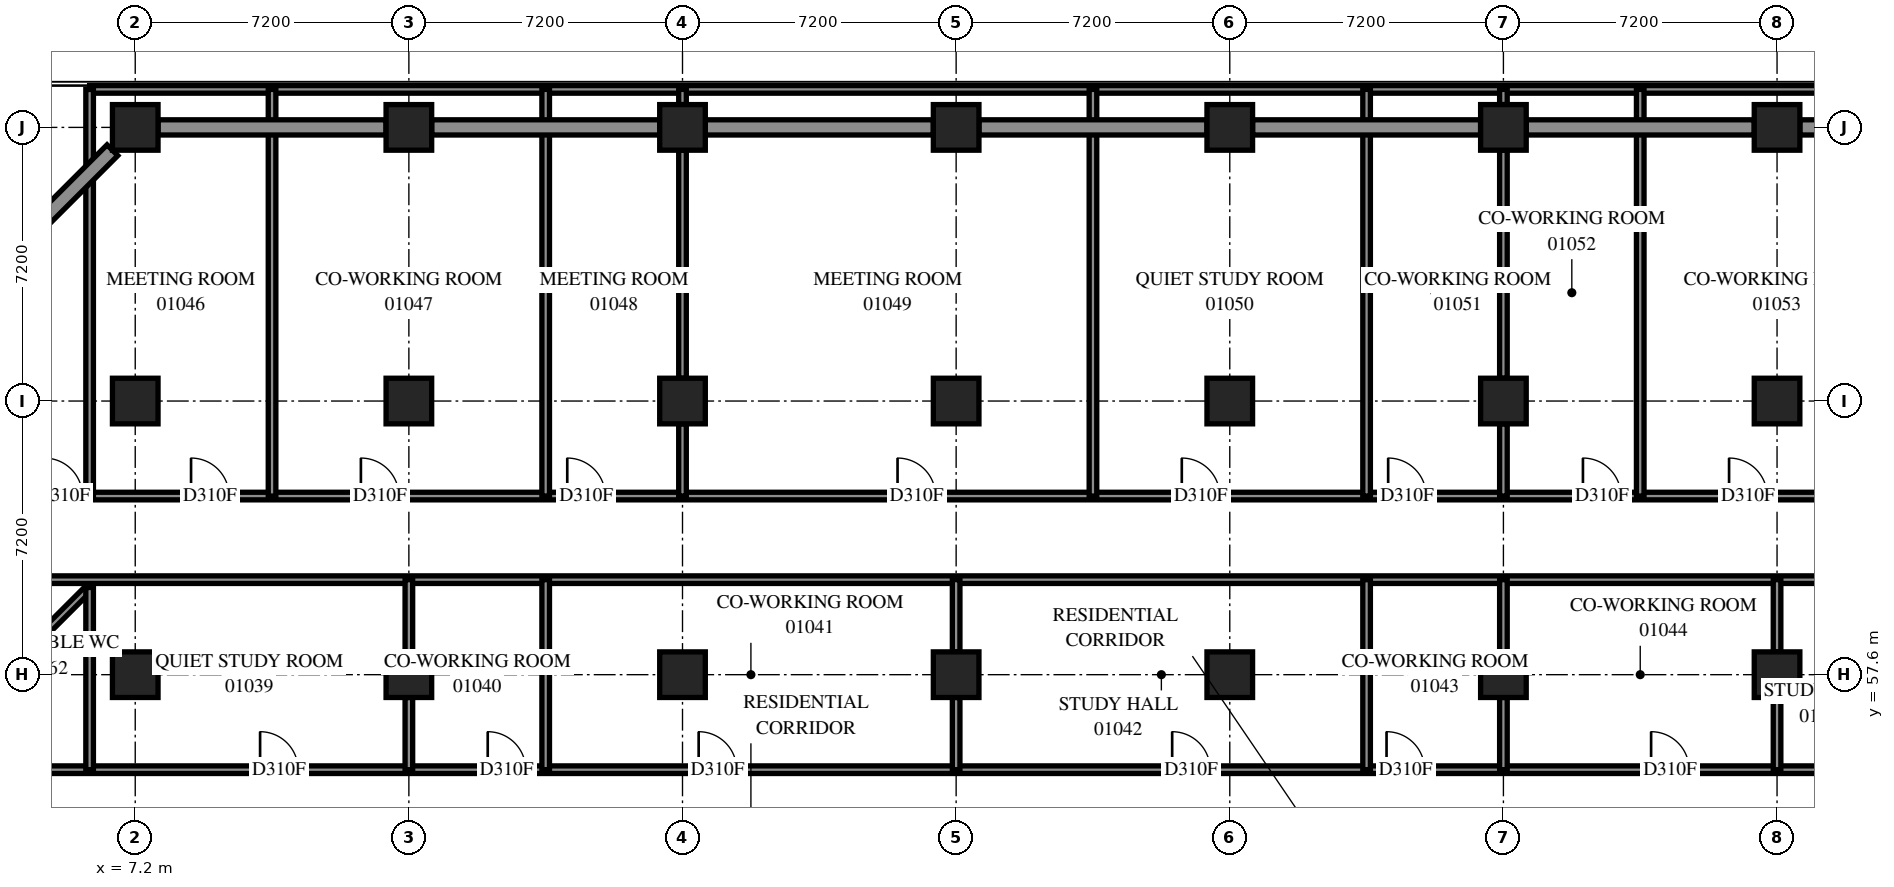
"""IFC4 building model, lengths in metres.
Left out: names, types, materials, properties, quantities, classifications, styles, units other than length and angle.
Written with IfcOpenShell. Run it as: python <this file> out.ifc"""

import sys

from ifc_helpers import new_model, si_unit, direction, frame, frame_2d, origin, origin_2d, place, context, subcontext, project, spatial, rectangle, extrude, element, fill, save


model = new_model("IFC4")
c1 = context("Model", 3, precision=1e-05, world=origin(), true_north=direction((0.0, 1.0)))
c2 = subcontext(c1, "Body", "Model", "MODEL_VIEW")
j1 = project(units=[si_unit("LENGTHUNIT", "METRE"), si_unit("PLANEANGLEUNIT", "RADIAN")], contexts=[c1])
p1 = place(None, origin())
s1 = spatial("IfcSite", under=j1, at=p1, CompositionType="ELEMENT")
p2 = place(p1, origin())
s2 = spatial("IfcBuilding", under=s1, at=p2, CompositionType="ELEMENT")
p3 = place(p2, frame((0.0, 0.0, 6.0)))
s3 = spatial("IfcBuildingStorey", under=s2, at=p3, CompositionType="ELEMENT", Elevation=6.0)
for number, where, z_axis, x_axis in (
    (1, (7.2, 57.6, 0.0), (0.0, 0.0, 1.0), (1.0, 0.0, 0.0)),
    (2, (7.2, 64.8, 0.0), (0.0, 0.0, 1.0), (1.0, 0.0, 0.0)),
    (3, (7.2, 72.0, 0.0), (0.0, 0.0, 1.0), (1.0, 0.0, 0.0)),
    (4, (14.4, 57.6, 0.0), (0.0, 0.0, 1.0), (1.0, 0.0, 0.0)),
    (5, (14.4, 64.8, 0.0), (0.0, 0.0, 1.0), (1.0, 0.0, 0.0)),
    (6, (14.4, 72.0, 0.0), (0.0, 0.0, 1.0), (1.0, 0.0, 0.0)),
    (7, (21.6, 57.6, 0.0), (0.0, 0.0, 1.0), (1.0, 0.0, 0.0)),
    (8, (21.6, 64.8, 0.0), (0.0, 0.0, 1.0), (1.0, 0.0, 0.0)),
    (9, (21.6, 72.0, 0.0), (0.0, 0.0, 1.0), (1.0, 0.0, 0.0)),
    (10, (28.8, 57.6, 0.0), (0.0, 0.0, 1.0), (1.0, 0.0, 0.0)),
    (11, (28.8, 64.8, 0.0), (0.0, 0.0, 1.0), (1.0, 0.0, 0.0)),
    (12, (28.8, 72.0, 0.0), (0.0, 0.0, 1.0), (1.0, 0.0, 0.0)),
    (13, (36.0, 57.6, 0.0), (0.0, 0.0, 1.0), (1.0, 0.0, 0.0)),
    (14, (36.0, 64.8, 0.0), (0.0, 0.0, 1.0), (1.0, 0.0, 0.0)),
    (15, (36.0, 72.0, 0.0), (0.0, 0.0, 1.0), (1.0, 0.0, 0.0)),
    (16, (43.2, 57.6, 0.0), (0.0, 0.0, 1.0), (1.0, 0.0, 0.0)),
    (17, (43.2, 64.8, 0.0), (0.0, 0.0, 1.0), (1.0, 0.0, 0.0)),
    (18, (43.2, 72.0, 0.0), (0.0, 0.0, 1.0), (1.0, 0.0, 0.0)),
    (19, (50.4, 57.6, 0.0), (0.0, 0.0, 1.0), (1.0, 0.0, 0.0)),
    (20, (50.4, 64.8, 0.0), (0.0, 0.0, 1.0), (1.0, 0.0, 0.0)),
    (21, (50.4, 72.0, 0.0), (0.0, 0.0, 1.0), (1.0, 0.0, 0.0)),
):
    element("IfcColumn", number, at=place(p3, frame(where, z_axis=z_axis, x_axis=x_axis)), inside=s3, PredefinedType="COLUMN", context=c2, shape_type="SweptSolid", body=[
        extrude(rectangle(XDim=1.2, YDim=1.2, at=origin_2d()), origin(), (0.0, 0.0, 1.0), 3.8),
    ])
p4 = place(p3, frame((6.0, 73.0, 0.0), z_axis=(0.0, 0.0, 1.0), x_axis=(1.0, 0.0, 0.0)))
e22 = element("IfcWall", 22, at=p4, inside=s3, PredefinedType="PARTITIONING", context=c2, shape_type="SweptSolid", body=[
    extrude(rectangle(XDim=73.2, YDim=0.2, at=frame_2d((36.6, 0.0))), origin(), (0.0, 0.0, 1.0), 3.8),
])
p5 = place(p3, frame((0.0, 55.1, 0.0), z_axis=(0.0, 0.0, 1.0), x_axis=(1.0, 0.0, 0.0)))
e23 = element("IfcWall", 23, at=p5, inside=s3, PredefinedType="PARTITIONING", context=c2, shape_type="SweptSolid", body=[
    extrude(rectangle(XDim=54.4, YDim=0.2, at=frame_2d((27.2, 0.0))), origin(), (0.0, 0.0, 1.0), 3.8),
])
p6 = place(p5, frame((10.485, 0.0, 0.0)))
e24 = element("IfcOpeningElement", 24, at=p6, cuts=e23, PredefinedType="OPENING", context=c2, shape_type="SweptSolid", body=[
    extrude(rectangle(XDim=1.0, YDim=2.1, at=frame_2d((0.5, 1.05))), frame((0.0, 0.11, 0.0), z_axis=(0.0, -1.0, 0.0), x_axis=(1.0, 0.0, 0.0)), (0.0, 0.0, 1.0), 0.22),
])
p7 = place(p5, frame((16.475, 0.0, 0.0)))
e25 = element("IfcOpeningElement", 25, at=p7, cuts=e23, PredefinedType="OPENING", context=c2, shape_type="SweptSolid", body=[
    extrude(rectangle(XDim=1.0, YDim=2.1, at=frame_2d((0.5, 1.05))), frame((0.0, 0.11, 0.0), z_axis=(0.0, -1.0, 0.0), x_axis=(1.0, 0.0, 0.0)), (0.0, 0.0, 1.0), 0.22),
])
p8 = place(p5, frame((22.025, 0.0, 0.0)))
e26 = element("IfcOpeningElement", 26, at=p8, cuts=e23, PredefinedType="OPENING", context=c2, shape_type="SweptSolid", body=[
    extrude(rectangle(XDim=1.0, YDim=2.1, at=frame_2d((0.5, 1.05))), frame((0.0, 0.11, 0.0), z_axis=(0.0, -1.0, 0.0), x_axis=(1.0, 0.0, 0.0)), (0.0, 0.0, 1.0), 0.22),
])
p9 = place(p5, frame((34.484, 0.0, 0.0)))
e27 = element("IfcOpeningElement", 27, at=p9, cuts=e23, PredefinedType="OPENING", context=c2, shape_type="SweptSolid", body=[
    extrude(rectangle(XDim=1.0, YDim=2.1, at=frame_2d((0.5, 1.05))), frame((0.0, 0.11, 0.0), z_axis=(0.0, -1.0, 0.0), x_axis=(1.0, 0.0, 0.0)), (0.0, 0.0, 1.0), 0.22),
])
p10 = place(p5, frame((40.125, 0.0, 0.0)))
e28 = element("IfcOpeningElement", 28, at=p10, cuts=e23, PredefinedType="OPENING", context=c2, shape_type="SweptSolid", body=[
    extrude(rectangle(XDim=1.0, YDim=2.1, at=frame_2d((0.5, 1.05))), frame((0.0, 0.11, 0.0), z_axis=(0.0, -1.0, 0.0), x_axis=(1.0, 0.0, 0.0)), (0.0, 0.0, 1.0), 0.22),
])
p11 = place(p5, frame((47.086, 0.0, 0.0)))
e29 = element("IfcOpeningElement", 29, at=p11, cuts=e23, PredefinedType="OPENING", context=c2, shape_type="SweptSolid", body=[
    extrude(rectangle(XDim=1.0, YDim=2.1, at=frame_2d((0.5, 1.05))), frame((0.0, 0.11, 0.0), z_axis=(0.0, -1.0, 0.0), x_axis=(1.0, 0.0, 0.0)), (0.0, 0.0, 1.0), 0.22),
])
p12 = place(p5, frame((52.709, 0.0, 0.0)))
e30 = element("IfcOpeningElement", 30, at=p12, cuts=e23, PredefinedType="OPENING", context=c2, shape_type="SweptSolid", body=[
    extrude(rectangle(XDim=1.0, YDim=2.1, at=frame_2d((0.5, 1.05))), frame((0.0, 0.11, 0.0), z_axis=(0.0, -1.0, 0.0), x_axis=(1.0, 0.0, 0.0)), (0.0, 0.0, 1.0), 0.22),
])
p13 = place(p5, frame((2.451, 0.0, 0.0)))
e31 = element("IfcOpeningElement", 31, at=p13, cuts=e23, PredefinedType="OPENING", context=c2, shape_type="SweptSolid", body=[
    extrude(rectangle(XDim=1.0, YDim=2.1, at=frame_2d((0.5, 1.05))), frame((0.0, 0.11, 0.0), z_axis=(0.0, -1.0, 0.0), x_axis=(1.0, 0.0, 0.0)), (0.0, 0.0, 1.0), 0.22),
])
p14 = place(p3, frame((0.002, 60.1, 0.0), z_axis=(0.0, 0.0, 1.0), x_axis=(1.0, 0.0, 0.0)))
e32 = element("IfcWall", 32, at=p14, inside=s3, PredefinedType="PARTITIONING", context=c2, shape_type="SweptSolid", body=[
    extrude(rectangle(XDim=54.398, YDim=0.2, at=frame_2d((27.199, 0.0))), origin(), (0.0, 0.0, 1.0), 3.8),
])
p15 = place(p14, frame((3.729, 0.0, 0.0)))
e33 = element("IfcOpeningElement", 33, at=p15, cuts=e32, PredefinedType="OPENING", context=c2, shape_type="SweptSolid", body=[
    extrude(rectangle(XDim=1.0, YDim=2.1, at=frame_2d((0.5, 1.05))), frame((0.0, 0.11, 0.0), z_axis=(0.0, -1.0, 0.0), x_axis=(1.0, 0.0, 0.0)), (0.0, 0.0, 1.0), 0.22),
])
p16 = place(p3, frame((0.002, 62.3, 0.0), z_axis=(0.0, 0.0, 1.0), x_axis=(1.0, 0.0, 0.0)))
e34 = element("IfcWall", 34, at=p16, inside=s3, PredefinedType="PARTITIONING", context=c2, shape_type="SweptSolid", body=[
    extrude(rectangle(XDim=54.398, YDim=0.2, at=frame_2d((27.199, 0.0))), origin(), (0.0, 0.0, 1.0), 3.8),
])
p17 = place(p16, frame((8.667, 0.0, 0.0)))
e35 = element("IfcOpeningElement", 35, at=p17, cuts=e34, PredefinedType="OPENING", context=c2, shape_type="SweptSolid", body=[
    extrude(rectangle(XDim=1.0, YDim=2.1, at=frame_2d((0.5, 1.05))), frame((0.0, 0.11, 0.0), z_axis=(0.0, -1.0, 0.0), x_axis=(1.0, 0.0, 0.0)), (0.0, 0.0, 1.0), 0.22),
])
p18 = place(p16, frame((13.136, 0.0, 0.0)))
e36 = element("IfcOpeningElement", 36, at=p18, cuts=e34, PredefinedType="OPENING", context=c2, shape_type="SweptSolid", body=[
    extrude(rectangle(XDim=1.0, YDim=2.1, at=frame_2d((0.5, 1.05))), frame((0.0, 0.11, 0.0), z_axis=(0.0, -1.0, 0.0), x_axis=(1.0, 0.0, 0.0)), (0.0, 0.0, 1.0), 0.22),
])
p19 = place(p16, frame((18.566, 0.0, 0.0)))
e37 = element("IfcOpeningElement", 37, at=p19, cuts=e34, PredefinedType="OPENING", context=c2, shape_type="SweptSolid", body=[
    extrude(rectangle(XDim=1.0, YDim=2.1, at=frame_2d((0.5, 1.05))), frame((0.0, 0.11, 0.0), z_axis=(0.0, -1.0, 0.0), x_axis=(1.0, 0.0, 0.0)), (0.0, 0.0, 1.0), 0.22),
])
p20 = place(p16, frame((27.256, 0.0, 0.0)))
e38 = element("IfcOpeningElement", 38, at=p20, cuts=e34, PredefinedType="OPENING", context=c2, shape_type="SweptSolid", body=[
    extrude(rectangle(XDim=1.0, YDim=2.1, at=frame_2d((0.5, 1.05))), frame((0.0, 0.11, 0.0), z_axis=(0.0, -1.0, 0.0), x_axis=(1.0, 0.0, 0.0)), (0.0, 0.0, 1.0), 0.22),
])
p21 = place(p16, frame((34.736, 0.0, 0.0)))
e39 = element("IfcOpeningElement", 39, at=p21, cuts=e34, PredefinedType="OPENING", context=c2, shape_type="SweptSolid", body=[
    extrude(rectangle(XDim=1.0, YDim=2.1, at=frame_2d((0.5, 1.05))), frame((0.0, 0.11, 0.0), z_axis=(0.0, -1.0, 0.0), x_axis=(1.0, 0.0, 0.0)), (0.0, 0.0, 1.0), 0.22),
])
p22 = place(p16, frame((40.166, 0.0, 0.0)))
e40 = element("IfcOpeningElement", 40, at=p22, cuts=e34, PredefinedType="OPENING", context=c2, shape_type="SweptSolid", body=[
    extrude(rectangle(XDim=1.0, YDim=2.1, at=frame_2d((0.5, 1.05))), frame((0.0, 0.11, 0.0), z_axis=(0.0, -1.0, 0.0), x_axis=(1.0, 0.0, 0.0)), (0.0, 0.0, 1.0), 0.22),
])
p23 = place(p16, frame((45.291, 0.0, 0.0)))
e41 = element("IfcOpeningElement", 41, at=p23, cuts=e34, PredefinedType="OPENING", context=c2, shape_type="SweptSolid", body=[
    extrude(rectangle(XDim=1.0, YDim=2.1, at=frame_2d((0.5, 1.05))), frame((0.0, 0.11, 0.0), z_axis=(0.0, -1.0, 0.0), x_axis=(1.0, 0.0, 0.0)), (0.0, 0.0, 1.0), 0.22),
])
p24 = place(p16, frame((49.136, 0.0, 0.0)))
e42 = element("IfcOpeningElement", 42, at=p24, cuts=e34, PredefinedType="OPENING", context=c2, shape_type="SweptSolid", body=[
    extrude(rectangle(XDim=1.0, YDim=2.1, at=frame_2d((0.5, 1.05))), frame((0.0, 0.11, 0.0), z_axis=(0.0, -1.0, 0.0), x_axis=(1.0, 0.0, 0.0)), (0.0, 0.0, 1.0), 0.22),
])
p25 = place(p16, frame((4.807, 0.0, 0.0)))
e43 = element("IfcOpeningElement", 43, at=p25, cuts=e34, PredefinedType="OPENING", context=c2, shape_type="SweptSolid", body=[
    extrude(rectangle(XDim=1.0, YDim=2.1, at=frame_2d((0.5, 1.05))), frame((0.0, 0.11, 0.0), z_axis=(0.0, -1.0, 0.0), x_axis=(1.0, 0.0, 0.0)), (0.0, 0.0, 1.0), 0.22),
])
for number, where, z_axis, x_axis in (
    (44, (10.8, 62.3, 0.0), (0.0, 0.0, 1.0), (0.0, 1.0, 0.0)),
    (45, (18.0, 62.3, 0.0), (0.0, 0.0, 1.0), (0.0, 1.0, 0.0)),
    (46, (32.4, 62.3, 0.0), (0.0, 0.0, 1.0), (0.0, 1.0, 0.0)),
    (47, (39.6, 62.3, 0.0), (0.0, 0.0, 1.0), (0.0, 1.0, 0.0)),
    (48, (46.8, 62.3, 0.0), (0.0, 0.0, 1.0), (0.0, 1.0, 0.0)),
):
    element("IfcWall", number, at=place(p3, frame(where, z_axis=z_axis, x_axis=x_axis)), inside=s3, PredefinedType="PARTITIONING", context=c2, shape_type="SweptSolid", body=[
        extrude(rectangle(XDim=10.7, YDim=0.2, at=frame_2d((5.35, 0.0))), origin(), (0.0, 0.0, 1.0), 3.8),
    ])
p26 = place(p3, frame((6.0, 62.3, 0.0), z_axis=(0.0, 0.0, 1.0), x_axis=(0.0, 1.0, 0.0)))
e49 = element("IfcWall", 49, at=p26, inside=s3, PredefinedType="PARTITIONING", context=c2, shape_type="SweptSolid", body=[
    extrude(rectangle(XDim=10.698, YDim=0.2, at=frame_2d((5.349, 0.0))), origin(), (0.0, 0.0, 1.0), 3.8),
])
p27 = place(p3, frame((1.205, 55.101, 0.0), z_axis=(0.0, 0.0, 1.0), x_axis=(0.7071067812, 0.7071067812, 0.0)))
e50 = element("IfcWall", 50, at=p27, inside=s3, PredefinedType="PARTITIONING", context=c2, shape_type="SweptSolid", body=[
    extrude(rectangle(XDim=6.78, YDim=0.2, at=frame_2d((3.39, 0.0))), origin(), (0.0, 0.0, 1.0), 3.8),
])
for number, where, z_axis, x_axis in (
    (51, (21.6, 65.4, 0.0), (0.0, 0.0, 1.0), (0.0, 1.0, 0.0)),
    (52, (43.2, 65.4, 0.0), (0.0, 0.0, 1.0), (0.0, 1.0, 0.0)),
):
    element("IfcWall", number, at=place(p3, frame(where, z_axis=z_axis, x_axis=x_axis)), inside=s3, PredefinedType="PARTITIONING", context=c2, shape_type="SweptSolid", body=[
        extrude(rectangle(XDim=6.0, YDim=0.2, at=frame_2d((3.0, 0.0))), origin(), (0.0, 0.0, 1.0), 3.8),
    ])
for number, where, z_axis, x_axis in (
    (53, (18.0, 55.1, 0.0), (0.0, 0.0, 1.0), (0.0, 1.0, 0.0)),
    (54, (39.6, 55.1, 0.0), (0.0, 0.0, 1.0), (0.0, 1.0, 0.0)),
):
    element("IfcWall", number, at=place(p3, frame(where, z_axis=z_axis, x_axis=x_axis)), inside=s3, PredefinedType="PARTITIONING", context=c2, shape_type="SweptSolid", body=[
        extrude(rectangle(XDim=5.0, YDim=0.2, at=frame_2d((2.5, 0.0))), origin(), (0.0, 0.0, 1.0), 3.8),
    ])
p28 = place(p3, frame((6.0, 55.1, 0.0), z_axis=(0.0, 0.0, 1.0), x_axis=(0.0, 1.0, 0.0)))
e55 = element("IfcWall", 55, at=p28, inside=s3, PredefinedType="PARTITIONING", context=c2, shape_type="SweptSolid", body=[
    extrude(rectangle(XDim=4.794, YDim=0.2, at=frame_2d((2.397, 0.0))), origin(), (0.0, 0.0, 1.0), 3.8),
])
for number, where, z_axis, x_axis in (
    (56, (21.6, 62.3, 0.0), (0.0, 0.0, 1.0), (0.0, 1.0, 0.0)),
    (57, (43.2, 62.3, 0.0), (0.0, 0.0, 1.0), (0.0, 1.0, 0.0)),
    (58, (14.4, 55.1, 0.0), (0.0, 0.0, 1.0), (0.0, 1.0, 0.0)),
    (59, (14.4, 58.2, 0.0), (0.0, 0.0, 1.0), (0.0, 1.0, 0.0)),
    (60, (28.8, 55.1, 0.0), (0.0, 0.0, 1.0), (0.0, 1.0, 0.0)),
    (61, (28.8, 58.2, 0.0), (0.0, 0.0, 1.0), (0.0, 1.0, 0.0)),
    (62, (43.2, 55.1, 0.0), (0.0, 0.0, 1.0), (0.0, 1.0, 0.0)),
    (63, (43.2, 58.2, 0.0), (0.0, 0.0, 1.0), (0.0, 1.0, 0.0)),
    (64, (50.4, 55.1, 0.0), (0.0, 0.0, 1.0), (0.0, 1.0, 0.0)),
    (65, (50.4, 58.2, 0.0), (0.0, 0.0, 1.0), (0.0, 1.0, 0.0)),
):
    element("IfcWall", number, at=place(p3, frame(where, z_axis=z_axis, x_axis=x_axis)), inside=s3, PredefinedType="PARTITIONING", context=c2, shape_type="SweptSolid", body=[
        extrude(rectangle(XDim=1.9, YDim=0.2, at=frame_2d((0.95, 0.0))), origin(), (0.0, 0.0, 1.0), 3.8),
    ])
for number, where, z_axis, x_axis in (
    (66, (21.6, 72.6, 0.0), (0.0, 0.0, 1.0), (0.0, 1.0, 0.0)),
    (67, (43.2, 72.6, 0.0), (0.0, 0.0, 1.0), (0.0, 1.0, 0.0)),
):
    element("IfcWall", number, at=place(p3, frame(where, z_axis=z_axis, x_axis=x_axis)), inside=s3, PredefinedType="PARTITIONING", context=c2, shape_type="SweptSolid", body=[
        extrude(rectangle(XDim=0.4, YDim=0.2, at=frame_2d((0.2, 0.0))), origin(), (0.0, 0.0, 1.0), 3.8),
    ])
p29 = place(p6, origin())
e68 = element("IfcDoor", 68, at=p29, inside=s3, OperationType="SINGLE_SWING_RIGHT", PredefinedType="DOOR", context=c2, shape_type="SweptSolid", body=[
    extrude(rectangle(XDim=1.0, YDim=2.1, at=frame_2d((0.5, 1.05))), frame((0.0, 0.025, 0.0), z_axis=(0.0, -1.0, 0.0), x_axis=(1.0, 0.0, 0.0)), (0.0, 0.0, 1.0), 0.05),
])
fill(e24, e68)
p30 = place(p7, origin())
e69 = element("IfcDoor", 69, at=p30, inside=s3, OperationType="SINGLE_SWING_RIGHT", PredefinedType="DOOR", context=c2, shape_type="SweptSolid", body=[
    extrude(rectangle(XDim=1.0, YDim=2.1, at=frame_2d((0.5, 1.05))), frame((0.0, 0.025, 0.0), z_axis=(0.0, -1.0, 0.0), x_axis=(1.0, 0.0, 0.0)), (0.0, 0.0, 1.0), 0.05),
])
fill(e25, e69)
p31 = place(p8, origin())
e70 = element("IfcDoor", 70, at=p31, inside=s3, OperationType="SINGLE_SWING_LEFT", PredefinedType="DOOR", context=c2, shape_type="SweptSolid", body=[
    extrude(rectangle(XDim=1.0, YDim=2.1, at=frame_2d((0.5, 1.05))), frame((0.0, 0.025, 0.0), z_axis=(0.0, -1.0, 0.0), x_axis=(1.0, 0.0, 0.0)), (0.0, 0.0, 1.0), 0.05),
])
fill(e26, e70)
p32 = place(p9, origin())
e71 = element("IfcDoor", 71, at=p32, inside=s3, OperationType="SINGLE_SWING_RIGHT", PredefinedType="DOOR", context=c2, shape_type="SweptSolid", body=[
    extrude(rectangle(XDim=1.0, YDim=2.1, at=frame_2d((0.5, 1.05))), frame((0.0, 0.025, 0.0), z_axis=(0.0, -1.0, 0.0), x_axis=(1.0, 0.0, 0.0)), (0.0, 0.0, 1.0), 0.05),
])
fill(e27, e71)
p33 = place(p10, origin())
e72 = element("IfcDoor", 72, at=p33, inside=s3, OperationType="SINGLE_SWING_LEFT", PredefinedType="DOOR", context=c2, shape_type="SweptSolid", body=[
    extrude(rectangle(XDim=1.0, YDim=2.1, at=frame_2d((0.5, 1.05))), frame((0.0, 0.025, 0.0), z_axis=(0.0, -1.0, 0.0), x_axis=(1.0, 0.0, 0.0)), (0.0, 0.0, 1.0), 0.05),
])
fill(e28, e72)
p34 = place(p11, origin())
e73 = element("IfcDoor", 73, at=p34, inside=s3, OperationType="SINGLE_SWING_RIGHT", PredefinedType="DOOR", context=c2, shape_type="SweptSolid", body=[
    extrude(rectangle(XDim=1.0, YDim=2.1, at=frame_2d((0.5, 1.05))), frame((0.0, 0.025, 0.0), z_axis=(0.0, -1.0, 0.0), x_axis=(1.0, 0.0, 0.0)), (0.0, 0.0, 1.0), 0.05),
])
fill(e29, e73)
p35 = place(p17, origin())
e74 = element("IfcDoor", 74, at=p35, inside=s3, OperationType="SINGLE_SWING_RIGHT", PredefinedType="DOOR", context=c2, shape_type="SweptSolid", body=[
    extrude(rectangle(XDim=1.0, YDim=2.1, at=frame_2d((0.5, 1.05))), frame((0.0, 0.025, 0.0), z_axis=(0.0, -1.0, 0.0), x_axis=(1.0, 0.0, 0.0)), (0.0, 0.0, 1.0), 0.05),
])
fill(e35, e74)
p36 = place(p18, origin())
e75 = element("IfcDoor", 75, at=p36, inside=s3, OperationType="SINGLE_SWING_LEFT", PredefinedType="DOOR", context=c2, shape_type="SweptSolid", body=[
    extrude(rectangle(XDim=1.0, YDim=2.1, at=frame_2d((0.5, 1.05))), frame((0.0, 0.025, 0.0), z_axis=(0.0, -1.0, 0.0), x_axis=(1.0, 0.0, 0.0)), (0.0, 0.0, 1.0), 0.05),
])
fill(e36, e75)
p37 = place(p19, origin())
e76 = element("IfcDoor", 76, at=p37, inside=s3, OperationType="SINGLE_SWING_LEFT", PredefinedType="DOOR", context=c2, shape_type="SweptSolid", body=[
    extrude(rectangle(XDim=1.0, YDim=2.1, at=frame_2d((0.5, 1.05))), frame((0.0, 0.025, 0.0), z_axis=(0.0, -1.0, 0.0), x_axis=(1.0, 0.0, 0.0)), (0.0, 0.0, 1.0), 0.05),
])
fill(e37, e76)
p38 = place(p20, origin())
e77 = element("IfcDoor", 77, at=p38, inside=s3, OperationType="SINGLE_SWING_RIGHT", PredefinedType="DOOR", context=c2, shape_type="SweptSolid", body=[
    extrude(rectangle(XDim=1.0, YDim=2.1, at=frame_2d((0.5, 1.05))), frame((0.0, 0.025, 0.0), z_axis=(0.0, -1.0, 0.0), x_axis=(1.0, 0.0, 0.0)), (0.0, 0.0, 1.0), 0.05),
])
fill(e38, e77)
p39 = place(p21, origin())
e78 = element("IfcDoor", 78, at=p39, inside=s3, OperationType="SINGLE_SWING_LEFT", PredefinedType="DOOR", context=c2, shape_type="SweptSolid", body=[
    extrude(rectangle(XDim=1.0, YDim=2.1, at=frame_2d((0.5, 1.05))), frame((0.0, 0.025, 0.0), z_axis=(0.0, -1.0, 0.0), x_axis=(1.0, 0.0, 0.0)), (0.0, 0.0, 1.0), 0.05),
])
fill(e39, e78)
p40 = place(p22, origin())
e79 = element("IfcDoor", 79, at=p40, inside=s3, OperationType="SINGLE_SWING_LEFT", PredefinedType="DOOR", context=c2, shape_type="SweptSolid", body=[
    extrude(rectangle(XDim=1.0, YDim=2.1, at=frame_2d((0.5, 1.05))), frame((0.0, 0.025, 0.0), z_axis=(0.0, -1.0, 0.0), x_axis=(1.0, 0.0, 0.0)), (0.0, 0.0, 1.0), 0.05),
])
fill(e40, e79)
p41 = place(p23, origin())
e80 = element("IfcDoor", 80, at=p41, inside=s3, OperationType="SINGLE_SWING_RIGHT", PredefinedType="DOOR", context=c2, shape_type="SweptSolid", body=[
    extrude(rectangle(XDim=1.0, YDim=2.1, at=frame_2d((0.5, 1.05))), frame((0.0, 0.025, 0.0), z_axis=(0.0, -1.0, 0.0), x_axis=(1.0, 0.0, 0.0)), (0.0, 0.0, 1.0), 0.05),
])
fill(e41, e80)
p42 = place(p24, origin())
e81 = element("IfcDoor", 81, at=p42, inside=s3, OperationType="SINGLE_SWING_LEFT", PredefinedType="DOOR", context=c2, shape_type="SweptSolid", body=[
    extrude(rectangle(XDim=1.0, YDim=2.1, at=frame_2d((0.5, 1.05))), frame((0.0, 0.025, 0.0), z_axis=(0.0, -1.0, 0.0), x_axis=(1.0, 0.0, 0.0)), (0.0, 0.0, 1.0), 0.05),
])
fill(e42, e81)
p43 = place(p25, origin())
e82 = element("IfcDoor", 82, at=p43, inside=s3, OperationType="SINGLE_SWING_LEFT", PredefinedType="DOOR", context=c2, shape_type="SweptSolid", body=[
    extrude(rectangle(XDim=1.0, YDim=2.1, at=frame_2d((0.5, 1.05))), frame((0.0, 0.025, 0.0), z_axis=(0.0, -1.0, 0.0), x_axis=(1.0, 0.0, 0.0)), (0.0, 0.0, 1.0), 0.05),
])
fill(e43, e82)
save(model, sys.argv[1])
